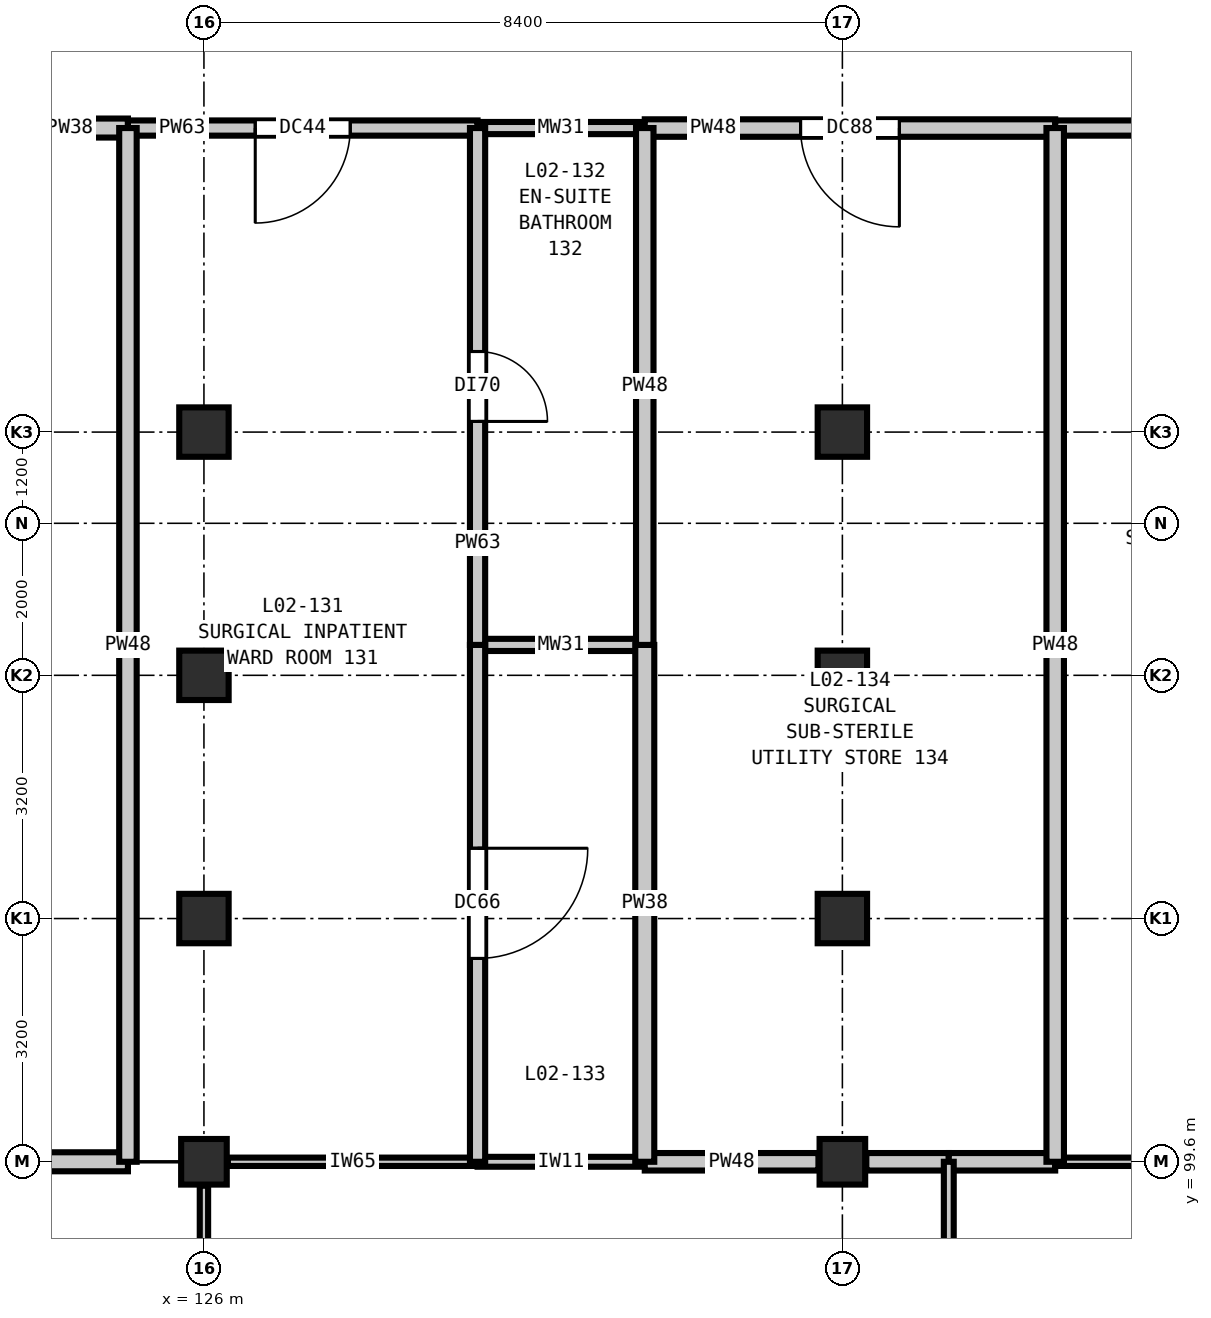
"""IFC4 building model, lengths in metres.
Left out: names, types, materials, properties, quantities, classifications, styles, units other than length and angle.
Written with IfcOpenShell. Run it as: python <this file> out.ifc"""

import sys

from ifc_helpers import new_model, si_unit, direction, frame, frame_2d, origin, origin_2d, place, context, subcontext, project, spatial, rectangle, extrude, element, fill, save


model = new_model("IFC4")
c1 = context("Model", 3, precision=1e-05, world=origin(), true_north=direction((0.0, 1.0)))
c2 = subcontext(c1, "Body", "Model", "MODEL_VIEW")
j1 = project(units=[si_unit("LENGTHUNIT", "METRE"), si_unit("PLANEANGLEUNIT", "RADIAN")], contexts=[c1])
p1 = place(None, origin())
s1 = spatial("IfcSite", under=j1, at=p1, CompositionType="ELEMENT")
p2 = place(p1, origin())
s2 = spatial("IfcBuilding", under=s1, at=p2, CompositionType="ELEMENT")
p3 = place(p2, frame((0.0, 0.0, 10.8)))
s3 = spatial("IfcBuildingStorey", under=s2, at=p3, CompositionType="ELEMENT", Elevation=10.8)
p4 = place(p3, frame((126.0, 99.6, 0.0), z_axis=(0.0, 0.0, 1.0), x_axis=(1.0, 0.0, 0.0)))
e1 = element("IfcColumn", 1, at=p4, inside=s3, PredefinedType="COLUMN", context=c2, shape_type="SweptSolid", body=[
    extrude(rectangle(XDim=0.6, YDim=0.6, at=origin_2d()), origin(), (0.0, 0.0, 1.0), 5.4),
])
for number, where, z_axis, x_axis in (
    (2, (126.0, 102.8, 0.0), (0.0, 0.0, 1.0), (1.0, 0.0, 0.0)),
    (3, (126.0, 106.0, 0.0), (0.0, 0.0, 1.0), (1.0, 0.0, 0.0)),
    (4, (126.0, 109.2, 0.0), (0.0, 0.0, 1.0), (1.0, 0.0, 0.0)),
):
    element("IfcColumn", number, at=place(p3, frame(where, z_axis=z_axis, x_axis=x_axis)), inside=s3, PredefinedType="COLUMN", context=c2, shape_type="SweptSolid", body=[
        extrude(rectangle(XDim=0.65, YDim=0.65, at=origin_2d()), origin(), (0.0, 0.0, 1.0), 5.4),
    ])
p5 = place(p3, frame((134.4, 99.6, 0.0), z_axis=(0.0, 0.0, 1.0), x_axis=(1.0, 0.0, 0.0)))
e5 = element("IfcColumn", 5, at=p5, inside=s3, PredefinedType="COLUMN", context=c2, shape_type="SweptSolid", body=[
    extrude(rectangle(XDim=0.6, YDim=0.6, at=origin_2d()), origin(), (0.0, 0.0, 1.0), 5.4),
])
for number, where, z_axis, x_axis in (
    (6, (134.4, 102.8, 0.0), (0.0, 0.0, 1.0), (1.0, 0.0, 0.0)),
    (7, (134.4, 106.0, 0.0), (0.0, 0.0, 1.0), (1.0, 0.0, 0.0)),
    (8, (134.4, 109.2, 0.0), (0.0, 0.0, 1.0), (1.0, 0.0, 0.0)),
):
    element("IfcColumn", number, at=place(p3, frame(where, z_axis=z_axis, x_axis=x_axis)), inside=s3, PredefinedType="COLUMN", context=c2, shape_type="SweptSolid", body=[
        extrude(rectangle(XDim=0.65, YDim=0.65, at=origin_2d()), origin(), (0.0, 0.0, 1.0), 5.4),
    ])
p6 = place(p3, frame((119.6, 99.6, 0.0), z_axis=(0.0, 0.0, 1.0), x_axis=(1.0, 0.0, 0.0)))
e9 = element("IfcWall", 9, at=p6, inside=s3, PredefinedType="PARTITIONING", context=c2, shape_type="SweptSolid", body=[
    extrude(rectangle(XDim=5.4, YDim=0.25, at=frame_2d((2.7, 0.0))), origin(), (0.0, 0.0, 1.0), 4.735),
])
p7 = place(p3, frame((126.315, 99.6, 0.0), z_axis=(0.0, 0.0, 1.0), x_axis=(1.0, 0.0, 0.0)))
e10 = element("IfcWall", 10, at=p7, inside=s3, PredefinedType="PARTITIONING", context=c2, shape_type="SweptSolid", body=[
    extrude(rectangle(XDim=3.285, YDim=0.11, at=frame_2d((1.643, 0.0))), origin(), (0.0, 0.0, 1.0), 4.735),
])
p8 = place(p3, frame((129.6, 99.6, 0.0), z_axis=(0.0, 0.0, 1.0), x_axis=(1.0, 0.0, 0.0)))
e11 = element("IfcWall", 11, at=p8, inside=s3, PredefinedType="PARTITIONING", context=c2, shape_type="SweptSolid", body=[
    extrude(rectangle(XDim=2.2, YDim=0.13, at=frame_2d((1.1, 0.0))), origin(), (0.0, 0.0, 1.0), 4.735),
])
p9 = place(p3, frame((131.8, 99.6, 0.0), z_axis=(0.0, 0.0, 1.0), x_axis=(1.0, 0.0, 0.0)))
e12 = element("IfcWall", 12, at=p9, inside=s3, PredefinedType="PARTITIONING", context=c2, shape_type="SweptSolid", body=[
    extrude(rectangle(XDim=2.285, YDim=0.23, at=frame_2d((1.143, 0.0))), origin(), (0.0, 0.0, 1.0), 4.735),
])
p10 = place(p3, frame((134.715, 99.6, 0.0), z_axis=(0.0, 0.0, 1.0), x_axis=(1.0, 0.0, 0.0)))
e13 = element("IfcWall", 13, at=p10, inside=s3, PredefinedType="PARTITIONING", context=c2, shape_type="SweptSolid", body=[
    extrude(rectangle(XDim=1.085, YDim=0.23, at=frame_2d((0.542, 0.0))), origin(), (0.0, 0.0, 1.0), 4.735),
])
p11 = place(p3, frame((135.8, 99.6, 0.0), z_axis=(0.0, 0.0, 1.0), x_axis=(1.0, 0.0, 0.0)))
e14 = element("IfcWall", 14, at=p11, inside=s3, PredefinedType="PARTITIONING", context=c2, shape_type="SweptSolid", body=[
    extrude(rectangle(XDim=1.4, YDim=0.23, at=frame_2d((0.7, 0.0))), origin(), (0.0, 0.0, 1.0), 4.735),
])
p12 = place(p3, frame((137.2, 99.6, 0.0), z_axis=(0.0, 0.0, 1.0), x_axis=(1.0, 0.0, 0.0)))
e15 = element("IfcWall", 15, at=p12, inside=s3, PredefinedType="PARTITIONING", context=c2, shape_type="SweptSolid", body=[
    extrude(rectangle(XDim=4.6, YDim=0.11, at=frame_2d((2.3, 0.0))), origin(), (0.0, 0.0, 1.0), 4.735),
])
p13 = place(p3, frame((129.6, 106.4, 0.0), z_axis=(0.0, 0.0, 1.0), x_axis=(1.0, 0.0, 0.0)))
e16 = element("IfcWall", 16, at=p13, inside=s3, PredefinedType="PLUMBINGWALL", context=c2, shape_type="SweptSolid", body=[
    extrude(rectangle(XDim=2.2, YDim=0.16, at=frame_2d((1.1, 0.0))), origin(), (0.0, 0.0, 1.0), 5.07),
])
p14 = place(p3, frame((119.6, 113.2, 0.0), z_axis=(0.0, 0.0, 1.0), x_axis=(1.0, 0.0, 0.0)))
e17 = element("IfcWall", 17, at=p14, inside=s3, PredefinedType="PARTITIONING", context=c2, shape_type="SweptSolid", body=[
    extrude(rectangle(XDim=5.4, YDim=0.25, at=frame_2d((2.7, 0.0))), origin(), (0.0, 0.0, 1.0), 5.07),
])
p15 = place(p14, frame((1.775, 0.0, 0.0)))
e18 = element("IfcOpeningElement", 18, at=p15, cuts=e17, PredefinedType="OPENING", context=c2, shape_type="SweptSolid", body=[
    extrude(rectangle(XDim=1.85, YDim=2.3, at=frame_2d((0.925, 1.15))), frame((0.0, 0.135, 0.0), z_axis=(0.0, -1.0, 0.0), x_axis=(1.0, 0.0, 0.0)), (0.0, 0.0, 1.0), 0.27),
])
p16 = place(p3, frame((125.0, 113.2, 0.0), z_axis=(0.0, 0.0, 1.0), x_axis=(1.0, 0.0, 0.0)))
e19 = element("IfcWall", 19, at=p16, inside=s3, PredefinedType="PARTITIONING", context=c2, shape_type="SweptSolid", body=[
    extrude(rectangle(XDim=4.6, YDim=0.2, at=frame_2d((2.3, 0.0))), origin(), (0.0, 0.0, 1.0), 5.07),
])
p17 = place(p16, frame((1.675, 0.0, 0.0)))
e20 = element("IfcOpeningElement", 20, at=p17, cuts=e19, PredefinedType="OPENING", context=c2, shape_type="SweptSolid", body=[
    extrude(rectangle(XDim=1.25, YDim=2.15, at=frame_2d((0.625, 1.075))), frame((0.0, 0.11, 0.0), z_axis=(0.0, -1.0, 0.0), x_axis=(1.0, 0.0, 0.0)), (0.0, 0.0, 1.0), 0.22),
])
p18 = place(p3, frame((129.6, 113.2, 0.0), z_axis=(0.0, 0.0, 1.0), x_axis=(1.0, 0.0, 0.0)))
e21 = element("IfcWall", 21, at=p18, inside=s3, PredefinedType="PLUMBINGWALL", context=c2, shape_type="SweptSolid", body=[
    extrude(rectangle(XDim=2.2, YDim=0.16, at=frame_2d((1.1, 0.0))), origin(), (0.0, 0.0, 1.0), 5.07),
])
p19 = place(p3, frame((131.8, 113.2, 0.0), z_axis=(0.0, 0.0, 1.0), x_axis=(1.0, 0.0, 0.0)))
e22 = element("IfcWall", 22, at=p19, inside=s3, PredefinedType="PARTITIONING", context=c2, shape_type="SweptSolid", body=[
    extrude(rectangle(XDim=5.4, YDim=0.23, at=frame_2d((2.7, 0.0))), origin(), (0.0, 0.0, 1.0), 5.07),
])
p20 = place(p19, frame((2.05, 0.0, 0.0)))
e23 = element("IfcOpeningElement", 23, at=p20, cuts=e22, PredefinedType="OPENING", context=c2, shape_type="SweptSolid", body=[
    extrude(rectangle(XDim=1.3, YDim=2.2, at=frame_2d((0.65, 1.1))), frame((0.0, 0.125, 0.0), z_axis=(0.0, -1.0, 0.0), x_axis=(1.0, 0.0, 0.0)), (0.0, 0.0, 1.0), 0.25),
])
p21 = place(p3, frame((137.2, 113.2, 0.0), z_axis=(0.0, 0.0, 1.0), x_axis=(1.0, 0.0, 0.0)))
e24 = element("IfcWall", 24, at=p21, inside=s3, PredefinedType="PARTITIONING", context=c2, shape_type="SweptSolid", body=[
    extrude(rectangle(XDim=4.6, YDim=0.2, at=frame_2d((2.3, 0.0))), origin(), (0.0, 0.0, 1.0), 5.07),
])
p22 = place(p21, frame((1.625, 0.0, 0.0)))
e25 = element("IfcOpeningElement", 25, at=p22, cuts=e24, PredefinedType="OPENING", context=c2, shape_type="SweptSolid", body=[
    extrude(rectangle(XDim=1.35, YDim=2.2, at=frame_2d((0.675, 1.1))), frame((0.0, 0.11, 0.0), z_axis=(0.0, -1.0, 0.0), x_axis=(1.0, 0.0, 0.0)), (0.0, 0.0, 1.0), 0.22),
])
p23 = place(p3, frame((125.0, 99.6, 0.0), z_axis=(0.0, 0.0, 1.0), x_axis=(0.0, 1.0, 0.0)))
e26 = element("IfcWall", 26, at=p23, inside=s3, PredefinedType="PARTITIONING", context=c2, shape_type="SweptSolid", body=[
    extrude(rectangle(XDim=13.6, YDim=0.23, at=frame_2d((6.8, 0.0))), origin(), (0.0, 0.0, 1.0), 5.07),
])
p24 = place(p3, frame((126.0, 91.515, 0.0), z_axis=(0.0, 0.0, 1.0), x_axis=(0.0, 1.0, 0.0)))
e27 = element("IfcWall", 27, at=p24, inside=s3, PredefinedType="PARTITIONING", context=c2, shape_type="SweptSolid", body=[
    extrude(rectangle(XDim=7.77, YDim=0.11, at=frame_2d((3.885, 0.0))), origin(), (0.0, 0.0, 1.0), 4.735),
])
p25 = place(p3, frame((129.6, 99.6, 0.0), z_axis=(0.0, 0.0, 1.0), x_axis=(0.0, 1.0, 0.0)))
e28 = element("IfcWall", 28, at=p25, inside=s3, PredefinedType="PARTITIONING", context=c2, shape_type="SweptSolid", body=[
    extrude(rectangle(XDim=6.8, YDim=0.2, at=frame_2d((3.4, 0.0))), origin(), (0.0, 0.0, 1.0), 5.07),
])
p26 = place(p25, frame((2.675, 0.0, 0.0)))
e29 = element("IfcOpeningElement", 29, at=p26, cuts=e28, PredefinedType="OPENING", context=c2, shape_type="SweptSolid", body=[
    extrude(rectangle(XDim=1.45, YDim=2.25, at=frame_2d((0.725, 1.125))), frame((0.0, 0.11, 0.0), z_axis=(0.0, -1.0, 0.0), x_axis=(1.0, 0.0, 0.0)), (0.0, 0.0, 1.0), 0.22),
])
p27 = place(p3, frame((129.6, 106.4, 0.0), z_axis=(0.0, 0.0, 1.0), x_axis=(0.0, 1.0, 0.0)))
e30 = element("IfcWall", 30, at=p27, inside=s3, PredefinedType="PARTITIONING", context=c2, shape_type="SweptSolid", body=[
    extrude(rectangle(XDim=6.8, YDim=0.2, at=frame_2d((3.4, 0.0))), origin(), (0.0, 0.0, 1.0), 5.07),
])
p28 = place(p27, frame((2.94, 0.0, 0.0)))
e31 = element("IfcOpeningElement", 31, at=p28, cuts=e30, PredefinedType="OPENING", context=c2, shape_type="SweptSolid", body=[
    extrude(rectangle(XDim=0.92, YDim=2.1, at=frame_2d((0.46, 1.05))), frame((0.0, 0.11, 0.0), z_axis=(0.0, -1.0, 0.0), x_axis=(1.0, 0.0, 0.0)), (0.0, 0.0, 1.0), 0.22),
])
p29 = place(p3, frame((131.8, 99.6, 0.0), z_axis=(0.0, 0.0, 1.0), x_axis=(0.0, 1.0, 0.0)))
e32 = element("IfcWall", 32, at=p29, inside=s3, PredefinedType="PARTITIONING", context=c2, shape_type="SweptSolid", body=[
    extrude(rectangle(XDim=6.8, YDim=0.25, at=frame_2d((3.4, 0.0))), origin(), (0.0, 0.0, 1.0), 5.07),
])
p30 = place(p3, frame((131.8, 106.4, 0.0), z_axis=(0.0, 0.0, 1.0), x_axis=(0.0, 1.0, 0.0)))
e33 = element("IfcWall", 33, at=p30, inside=s3, PredefinedType="PARTITIONING", context=c2, shape_type="SweptSolid", body=[
    extrude(rectangle(XDim=6.8, YDim=0.23, at=frame_2d((3.4, 0.0))), origin(), (0.0, 0.0, 1.0), 5.07),
])
p31 = place(p3, frame((135.8, 88.6, 0.0), z_axis=(0.0, 0.0, 1.0), x_axis=(0.0, 1.0, 0.0)))
e34 = element("IfcWall", 34, at=p31, inside=s3, PredefinedType="PARTITIONING", context=c2, shape_type="SweptSolid", body=[
    extrude(rectangle(XDim=11.0, YDim=0.13, at=frame_2d((5.5, 0.0))), origin(), (0.0, 0.0, 1.0), 5.07),
])
p32 = place(p3, frame((137.2, 99.6, 0.0), z_axis=(0.0, 0.0, 1.0), x_axis=(0.0, 1.0, 0.0)))
e35 = element("IfcWall", 35, at=p32, inside=s3, PredefinedType="PARTITIONING", context=c2, shape_type="SweptSolid", body=[
    extrude(rectangle(XDim=13.6, YDim=0.23, at=frame_2d((6.8, 0.0))), origin(), (0.0, 0.0, 1.0), 5.07),
])
p33 = place(p17, frame((1.25, 0.0, 0.0), z_axis=(0.0, 0.0, 1.0), x_axis=(-1.0, 0.0, 0.0)))
e36 = element("IfcDoor", 36, at=p33, inside=s3, OperationType="SINGLE_SWING_RIGHT", PredefinedType="DOOR", context=c2, shape_type="SweptSolid", body=[
    extrude(rectangle(XDim=1.25, YDim=2.15, at=frame_2d((0.625, 1.075))), frame((0.0, 0.025, 0.0), z_axis=(0.0, -1.0, 0.0), x_axis=(1.0, 0.0, 0.0)), (0.0, 0.0, 1.0), 0.05),
])
fill(e20, e36)
p34 = place(p20, frame((1.3, 0.0, 0.0), z_axis=(0.0, 0.0, 1.0), x_axis=(-1.0, 0.0, 0.0)))
e37 = element("IfcDoor", 37, at=p34, inside=s3, OperationType="SINGLE_SWING_LEFT", PredefinedType="DOOR", context=c2, shape_type="SweptSolid", body=[
    extrude(rectangle(XDim=1.3, YDim=2.2, at=frame_2d((0.65, 1.1))), frame((0.0, 0.025, 0.0), z_axis=(0.0, -1.0, 0.0), x_axis=(1.0, 0.0, 0.0)), (0.0, 0.0, 1.0), 0.05),
])
fill(e23, e37)
p35 = place(p26, frame((1.45, 0.0, 0.0), z_axis=(0.0, 0.0, 1.0), x_axis=(-1.0, 0.0, 0.0)))
e38 = element("IfcDoor", 38, at=p35, inside=s3, OperationType="SINGLE_SWING_LEFT", PredefinedType="DOOR", context=c2, shape_type="SweptSolid", body=[
    extrude(rectangle(XDim=1.45, YDim=2.25, at=frame_2d((0.725, 1.125))), frame((0.0, 0.025, 0.0), z_axis=(0.0, -1.0, 0.0), x_axis=(1.0, 0.0, 0.0)), (0.0, 0.0, 1.0), 0.05),
])
fill(e29, e38)
p36 = place(p28, frame((0.92, 0.0, 0.0), z_axis=(0.0, 0.0, 1.0), x_axis=(-1.0, 0.0, 0.0)))
e39 = element("IfcDoor", 39, at=p36, inside=s3, OperationType="SINGLE_SWING_RIGHT", PredefinedType="DOOR", context=c2, shape_type="SweptSolid", body=[
    extrude(rectangle(XDim=0.92, YDim=2.1, at=frame_2d((0.46, 1.05))), frame((0.0, 0.025, 0.0), z_axis=(0.0, -1.0, 0.0), x_axis=(1.0, 0.0, 0.0)), (0.0, 0.0, 1.0), 0.05),
])
fill(e31, e39)
save(model, sys.argv[1])
